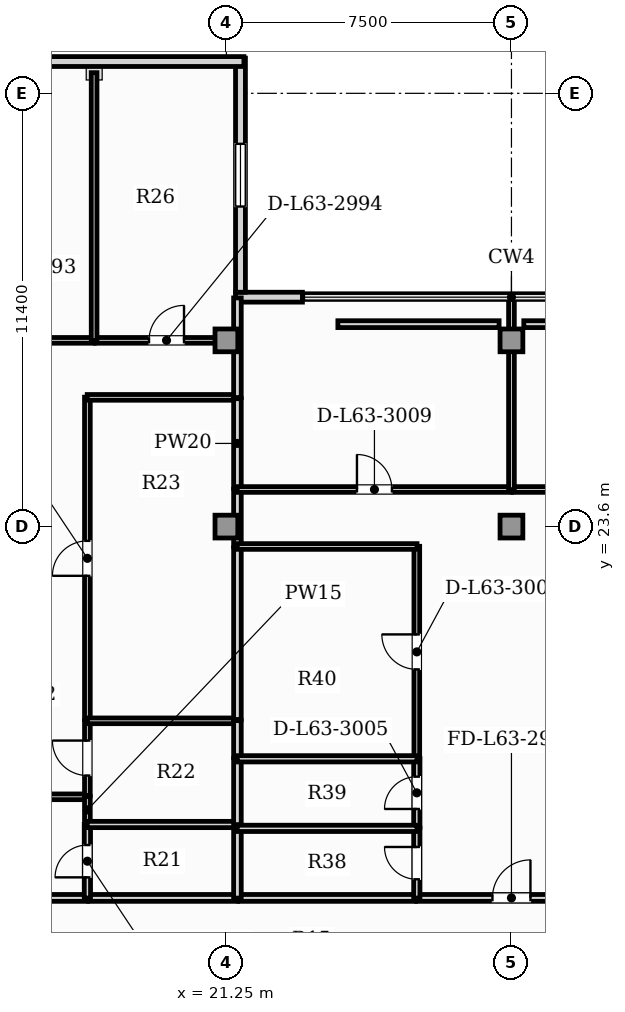
"""IFC4 building model, lengths in metres.
Left out: names, types, materials, properties, quantities, classifications, styles, units other than length and angle.
Written with IfcOpenShell. Run it as: python <this file> out.ifc"""

import sys

from ifc_helpers import new_model, si_unit, direction, frame, frame_2d, origin, origin_2d, place, context, subcontext, project, spatial, rectangle, extrude, element, fill, save


model = new_model("IFC4")
c1 = context("Model", 3, precision=1e-05, world=origin(), true_north=direction((0.0, 1.0)))
c2 = subcontext(c1, "Body", "Model", "MODEL_VIEW")
j1 = project(units=[si_unit("LENGTHUNIT", "METRE"), si_unit("PLANEANGLEUNIT", "RADIAN")], contexts=[c1])
p1 = place(None, origin())
s1 = spatial("IfcSite", under=j1, at=p1, CompositionType="ELEMENT")
p2 = place(p1, origin())
s2 = spatial("IfcBuilding", under=s1, at=p2, CompositionType="ELEMENT")
p3 = place(p2, frame((0.0, 0.0, 256.75)))
s3 = spatial("IfcBuildingStorey", under=s2, at=p3, CompositionType="ELEMENT", Elevation=256.75)
for number, where, z_axis, x_axis in (
    (1, (21.25, 23.6, 0.0), (0.0, 0.0, 1.0), (1.0, 0.0, 0.0)),
    (2, (28.75, 23.6, 0.0), (0.0, 0.0, 1.0), (1.0, 0.0, 0.0)),
    (3, (21.25, 28.5, 0.0), (0.0, 0.0, 1.0), (1.0, 0.0, 0.0)),
    (4, (28.75, 28.5, 0.0), (0.0, 0.0, 1.0), (1.0, 0.0, 0.0)),
):
    element("IfcColumn", number, at=place(p3, frame(where, z_axis=z_axis, x_axis=x_axis)), inside=s3, PredefinedType="COLUMN", context=c2, shape_type="SweptSolid", body=[
        extrude(rectangle(XDim=0.6, YDim=0.6, at=origin_2d()), origin(), (0.0, 0.0, 1.0), 3.85),
    ])
p4 = place(p3, frame((21.49, 29.636, 0.0), z_axis=(0.0, 0.0, 1.0), x_axis=(1.0, 0.0, 0.0)))
e5 = element("IfcWall", 5, at=p4, inside=s3, PredefinedType="SOLIDWALL", context=c2, shape_type="SweptSolid", body=[
    extrude(rectangle(XDim=1.76, YDim=0.26, at=frame_2d((0.88, 0.0))), origin(), (0.0, 0.0, 1.0), 3.65),
])
p5 = place(p3, frame((21.62, 29.766, 0.0), z_axis=(0.0, 0.0, 1.0), x_axis=(0.0, 1.0, 0.0)))
e6 = element("IfcWall", 6, at=p5, inside=s3, PredefinedType="SOLIDWALL", context=c2, shape_type="SweptSolid", body=[
    extrude(rectangle(XDim=6.16, YDim=0.26, at=frame_2d((3.08, 0.0))), origin(), (0.0, 0.0, 1.0), 3.65),
])
p6 = place(p5, frame((2.255, 0.0, 0.88)))
e7 = element("IfcOpeningElement", 7, at=p6, cuts=e6, PredefinedType="OPENING", context=c2, shape_type="SweptSolid", body=[
    extrude(rectangle(XDim=1.65, YDim=2.0, at=frame_2d((0.825, 1.0))), frame((0.0, 0.14, 0.0), z_axis=(0.0, -1.0, 0.0), x_axis=(1.0, 0.0, 0.0)), (0.0, 0.0, 1.0), 0.28),
])
p7 = place(p3, frame((21.71, 35.836, 0.0), z_axis=(0.0, 0.0, 1.0), x_axis=(-1.0, 0.0, 0.0)))
e8 = element("IfcWall", 8, at=p7, inside=s3, PredefinedType="SOLIDWALL", context=c2, shape_type="SweptSolid", body=[
    extrude(rectangle(XDim=10.543, YDim=0.26, at=frame_2d((5.272, 0.0))), origin(), (0.0, 0.0, 1.0), 3.65),
])
p8 = place(p7, frame((8.863, 0.0, 0.95)))
e9 = element("IfcOpeningElement", 9, at=p8, cuts=e8, PredefinedType="OPENING", context=c2, shape_type="SweptSolid", body=[
    extrude(rectangle(XDim=0.9, YDim=1.5, at=frame_2d((0.45, 0.75))), frame((0.0, 0.14, 0.0), z_axis=(0.0, -1.0, 0.0), x_axis=(1.0, 0.0, 0.0)), (0.0, 0.0, 1.0), 0.28),
])
p9 = place(p7, frame((5.963, 0.0, 0.88)))
e10 = element("IfcOpeningElement", 10, at=p9, cuts=e8, PredefinedType="OPENING", context=c2, shape_type="SweptSolid", body=[
    extrude(rectangle(XDim=1.65, YDim=2.0, at=frame_2d((0.825, 1.0))), frame((0.0, 0.14, 0.0), z_axis=(0.0, -1.0, 0.0), x_axis=(1.0, 0.0, 0.0)), (0.0, 0.0, 1.0), 0.28),
])
p10 = place(p3, frame((12.607, 13.83, 0.0), z_axis=(0.0, 0.0, 1.0), x_axis=(1.0, 0.0, 0.0)))
e11 = element("IfcWall", 11, at=p10, inside=s3, PredefinedType="PARTITIONING", context=c2, shape_type="SweptSolid", body=[
    extrude(rectangle(XDim=4.99, YDim=0.18, at=frame_2d((2.495, 0.0))), origin(), (0.0, 0.0, 1.0), 3.65),
])
p11 = place(p10, frame((1.995, 0.0, 0.0)))
e12 = element("IfcOpeningElement", 12, at=p11, cuts=e11, PredefinedType="OPENING", context=c2, shape_type="SweptSolid", body=[
    extrude(rectangle(XDim=1.0, YDim=2.15, at=frame_2d((0.5, 1.075))), frame((0.0, 0.1, 0.0), z_axis=(0.0, -1.0, 0.0), x_axis=(1.0, 0.0, 0.0)), (0.0, 0.0, 1.0), 0.2),
])
p12 = place(p3, frame((17.627, 13.83, 0.0), z_axis=(0.0, 0.0, 1.0), x_axis=(1.0, 0.0, 0.0)))
e13 = element("IfcWall", 13, at=p12, inside=s3, PredefinedType="PARTITIONING", context=c2, shape_type="SweptSolid", body=[
    extrude(rectangle(XDim=3.918, YDim=0.18, at=frame_2d((1.959, 0.0))), origin(), (0.0, 0.0, 1.0), 3.65),
])
p13 = place(p3, frame((26.255, 13.83, 0.0), z_axis=(0.0, 0.0, 1.0), x_axis=(1.0, 0.0, 0.0)))
e14 = element("IfcWall", 14, at=p13, inside=s3, PredefinedType="PARTITIONING", context=c2, shape_type="SweptSolid", body=[
    extrude(rectangle(XDim=4.99, YDim=0.18, at=frame_2d((2.495, 0.0))), origin(), (0.0, 0.0, 1.0), 3.65),
])
p14 = place(p13, frame((1.995, 0.0, 0.0)))
e15 = element("IfcOpeningElement", 15, at=p14, cuts=e14, PredefinedType="OPENING", context=c2, shape_type="SweptSolid", body=[
    extrude(rectangle(XDim=1.0, YDim=2.15, at=frame_2d((0.5, 1.075))), frame((0.0, 0.1, 0.0), z_axis=(0.0, -1.0, 0.0), x_axis=(1.0, 0.0, 0.0)), (0.0, 0.0, 1.0), 0.2),
])
p15 = place(p3, frame((21.575, 13.83, 0.0), z_axis=(0.0, 0.0, 1.0), x_axis=(1.0, 0.0, 0.0)))
e16 = element("IfcWall", 16, at=p15, inside=s3, PredefinedType="PARTITIONING", context=c2, shape_type="SweptSolid", body=[
    extrude(rectangle(XDim=4.65, YDim=0.18, at=frame_2d((2.325, 0.0))), origin(), (0.0, 0.0, 1.0), 3.65),
])
p16 = place(p3, frame((12.607, 16.49, 0.0), z_axis=(0.0, 0.0, 1.0), x_axis=(1.0, 0.0, 0.0)))
e17 = element("IfcWall", 17, at=p16, inside=s3, PredefinedType="PARTITIONING", context=c2, shape_type="SweptSolid", body=[
    extrude(rectangle(XDim=4.99, YDim=0.15, at=frame_2d((2.495, 0.0))), origin(), (0.0, 0.0, 1.0), 3.65),
])
p17 = place(p16, frame((2.035, 0.0, 0.0)))
e18 = element("IfcOpeningElement", 18, at=p17, cuts=e17, PredefinedType="OPENING", context=c2, shape_type="SweptSolid", body=[
    extrude(rectangle(XDim=0.92, YDim=2.1, at=frame_2d((0.46, 1.05))), frame((0.0, 0.085, 0.0), z_axis=(0.0, -1.0, 0.0), x_axis=(1.0, 0.0, 0.0)), (0.0, 0.0, 1.0), 0.17),
])
p18 = place(p3, frame((17.592, 13.825, 0.0), z_axis=(0.0, 0.0, 1.0), x_axis=(0.0, 1.0, 0.0)))
e19 = element("IfcWall", 19, at=p18, inside=s3, PredefinedType="PLUMBINGWALL", context=c2, shape_type="SweptSolid", body=[
    extrude(rectangle(XDim=1.942, YDim=0.165, at=frame_2d((0.971, 0.0))), origin(), (0.0, 0.0, 1.0), 3.65),
])
p19 = place(p18, frame((0.546, 0.0, 0.0)))
e20 = element("IfcOpeningElement", 20, at=p19, cuts=e19, PredefinedType="OPENING", context=c2, shape_type="SweptSolid", body=[
    extrude(rectangle(XDim=0.85, YDim=2.1, at=frame_2d((0.425, 1.05))), frame((0.0, 0.093, 0.0), z_axis=(0.0, -1.0, 0.0), x_axis=(1.0, 0.0, 0.0)), (0.0, 0.0, 1.0), 0.185),
])
p20 = place(p3, frame((17.592, 15.797, 0.0), z_axis=(0.0, 0.0, 1.0), x_axis=(0.0, 1.0, 0.0)))
e21 = element("IfcWall", 21, at=p20, inside=s3, PredefinedType="PARTITIONING", context=c2, shape_type="SweptSolid", body=[
    extrude(rectangle(XDim=0.699, YDim=0.15, at=frame_2d((0.349, 0.0))), origin(), (0.0, 0.0, 1.0), 3.65),
])
p21 = place(p3, frame((17.592, 16.525, 0.0), z_axis=(0.0, 0.0, 1.0), x_axis=(0.0, 1.0, 0.0)))
e22 = element("IfcWall", 22, at=p21, inside=s3, PredefinedType="PARTITIONING", context=c2, shape_type="SweptSolid", body=[
    extrude(rectangle(XDim=1.969, YDim=0.15, at=frame_2d((0.984, 0.0))), origin(), (0.0, 0.0, 1.0), 3.65),
])
p22 = place(p21, frame((0.524, 0.0, 0.0)))
e23 = element("IfcOpeningElement", 23, at=p22, cuts=e22, PredefinedType="OPENING", context=c2, shape_type="SweptSolid", body=[
    extrude(rectangle(XDim=0.92, YDim=2.1, at=frame_2d((0.46, 1.05))), frame((0.0, 0.085, 0.0), z_axis=(0.0, -1.0, 0.0), x_axis=(1.0, 0.0, 0.0)), (0.0, 0.0, 1.0), 0.17),
])
p23 = place(p3, frame((17.592, 18.524, 0.0), z_axis=(0.0, 0.0, 1.0), x_axis=(0.0, 1.0, 0.0)))
e24 = element("IfcWall", 24, at=p23, inside=s3, PredefinedType="PARTITIONING", context=c2, shape_type="SweptSolid", body=[
    extrude(rectangle(XDim=8.48, YDim=0.15, at=frame_2d((4.24, 0.0))), origin(), (0.0, 0.0, 1.0), 3.65),
])
p24 = place(p23, frame((3.78, 0.0, 0.0)))
e25 = element("IfcOpeningElement", 25, at=p24, cuts=e24, PredefinedType="OPENING", context=c2, shape_type="SweptSolid", body=[
    extrude(rectangle(XDim=0.92, YDim=2.1, at=frame_2d((0.46, 1.05))), frame((0.0, 0.085, 0.0), z_axis=(0.0, -1.0, 0.0), x_axis=(1.0, 0.0, 0.0)), (0.0, 0.0, 1.0), 0.17),
])
p25 = place(p3, frame((17.587, 27.0, 0.0), z_axis=(0.0, 0.0, 1.0), x_axis=(1.0, 0.0, 0.0)))
e26 = element("IfcWall", 26, at=p25, inside=s3, PredefinedType="PARTITIONING", context=c2, shape_type="SweptSolid", body=[
    extrude(rectangle(XDim=3.958, YDim=0.15, at=frame_2d((1.979, 0.0))), origin(), (0.0, 0.0, 1.0), 3.65),
])
p26 = place(p3, frame((13.785, 28.5, 0.0), z_axis=(0.0, 0.0, 1.0), x_axis=(1.0, 0.0, 0.0)))
e27 = element("IfcWall", 27, at=p26, inside=s3, PredefinedType="PARTITIONING", context=c2, shape_type="SweptSolid", body=[
    extrude(rectangle(XDim=3.989, YDim=0.15, at=frame_2d((1.994, 0.0))), origin(), (0.0, 0.0, 1.0), 3.105),
])
p27 = place(p26, frame((1.534, 0.0, 0.0)))
e28 = element("IfcOpeningElement", 28, at=p27, cuts=e27, PredefinedType="OPENING", context=c2, shape_type="SweptSolid", body=[
    extrude(rectangle(XDim=0.92, YDim=2.1, at=frame_2d((0.46, 1.05))), frame((0.0, 0.085, 0.0), z_axis=(0.0, -1.0, 0.0), x_axis=(1.0, 0.0, 0.0)), (0.0, 0.0, 1.0), 0.17),
])
p28 = place(p3, frame((17.804, 28.5, 0.0), z_axis=(0.0, 0.0, 1.0), x_axis=(1.0, 0.0, 0.0)))
e29 = element("IfcWall", 29, at=p28, inside=s3, PredefinedType="PARTITIONING", context=c2, shape_type="SweptSolid", body=[
    extrude(rectangle(XDim=3.741, YDim=0.15, at=frame_2d((1.871, 0.0))), origin(), (0.0, 0.0, 1.0), 3.105),
])
p29 = place(p28, frame((1.411, 0.0, 0.0)))
e30 = element("IfcOpeningElement", 30, at=p29, cuts=e29, PredefinedType="OPENING", context=c2, shape_type="SweptSolid", body=[
    extrude(rectangle(XDim=0.92, YDim=2.1, at=frame_2d((0.46, 1.05))), frame((0.0, 0.085, 0.0), z_axis=(0.0, -1.0, 0.0), x_axis=(1.0, 0.0, 0.0)), (0.0, 0.0, 1.0), 0.17),
])
p30 = place(p3, frame((21.54, 26.995, 0.0), z_axis=(0.0, 0.0, 1.0), x_axis=(0.0, 1.0, 0.0)))
e31 = element("IfcWall", 31, at=p30, inside=s3, PredefinedType="PARTITIONING", context=c2, shape_type="SweptSolid", body=[
    extrude(rectangle(XDim=2.622, YDim=0.2, at=frame_2d((1.311, 0.0))), origin(), (0.0, 0.0, 1.0), 3.65),
])
p31 = place(p3, frame((17.587, 15.762, 0.0), z_axis=(0.0, 0.0, 1.0), x_axis=(1.0, 0.0, 0.0)))
e32 = element("IfcWall", 32, at=p31, inside=s3, PredefinedType="PLUMBINGWALL", context=c2, shape_type="SweptSolid", body=[
    extrude(rectangle(XDim=3.958, YDim=0.165, at=frame_2d((1.979, 0.0))), origin(), (0.0, 0.0, 1.0), 3.65),
])
p32 = place(p3, frame((21.54, 13.825, 0.0), z_axis=(0.0, 0.0, 1.0), x_axis=(0.0, 1.0, 0.0)))
e33 = element("IfcWall", 33, at=p32, inside=s3, PredefinedType="PARTITIONING", context=c2, shape_type="SweptSolid", body=[
    extrude(rectangle(XDim=1.84, YDim=0.2, at=frame_2d((0.92, 0.0))), origin(), (0.0, 0.0, 1.0), 3.65),
])
p33 = place(p3, frame((17.587, 18.49, 0.0), z_axis=(0.0, 0.0, 1.0), x_axis=(1.0, 0.0, 0.0)))
e34 = element("IfcWall", 34, at=p33, inside=s3, PredefinedType="PARTITIONING", context=c2, shape_type="SweptSolid", body=[
    extrude(rectangle(XDim=3.958, YDim=0.15, at=frame_2d((1.979, 0.0))), origin(), (0.0, 0.0, 1.0), 3.65),
])
p34 = place(p3, frame((21.54, 15.757, 0.0), z_axis=(0.0, 0.0, 1.0), x_axis=(0.0, 1.0, 0.0)))
e35 = element("IfcWall", 35, at=p34, inside=s3, PredefinedType="PARTITIONING", context=c2, shape_type="SweptSolid", body=[
    extrude(rectangle(XDim=1.739, YDim=0.2, at=frame_2d((0.869, 0.0))), origin(), (0.0, 0.0, 1.0), 3.65),
])
p35 = place(p3, frame((21.54, 17.525, 0.0), z_axis=(0.0, 0.0, 1.0), x_axis=(0.0, 1.0, 0.0)))
e36 = element("IfcWall", 36, at=p35, inside=s3, PredefinedType="PARTITIONING", context=c2, shape_type="SweptSolid", body=[
    extrude(rectangle(XDim=0.969, YDim=0.2, at=frame_2d((0.485, 0.0))), origin(), (0.0, 0.0, 1.0), 3.65),
])
p36 = place(p3, frame((21.54, 23.071, 0.0), z_axis=(0.0, 0.0, 1.0), x_axis=(0.0, 1.0, 0.0)))
e37 = element("IfcWall", 37, at=p36, inside=s3, PredefinedType="PARTITIONING", context=c2, shape_type="SweptSolid", body=[
    extrude(rectangle(XDim=1.51, YDim=0.2, at=frame_2d((0.755, 0.0))), origin(), (0.0, 0.0, 1.0), 3.65),
])
p37 = place(p3, frame((21.54, 18.524, 0.0), z_axis=(0.0, 0.0, 1.0), x_axis=(0.0, 1.0, 0.0)))
e38 = element("IfcWall", 38, at=p37, inside=s3, PredefinedType="PARTITIONING", context=c2, shape_type="SweptSolid", body=[
    extrude(rectangle(XDim=4.517, YDim=0.2, at=frame_2d((2.258, 0.0))), origin(), (0.0, 0.0, 1.0), 3.65),
])
p38 = place(p3, frame((21.54, 24.611, 0.0), z_axis=(0.0, 0.0, 1.0), x_axis=(0.0, 1.0, 0.0)))
e39 = element("IfcWall", 39, at=p38, inside=s3, PredefinedType="PARTITIONING", context=c2, shape_type="SweptSolid", body=[
    extrude(rectangle(XDim=2.354, YDim=0.2, at=frame_2d((1.177, 0.0))), origin(), (0.0, 0.0, 1.0), 3.65),
])
p39 = place(p3, frame((17.769, 28.495, 0.0), z_axis=(0.0, 0.0, 1.0), x_axis=(0.0, 1.0, 0.0)))
e40 = element("IfcWall", 40, at=p39, inside=s3, PredefinedType="PARTITIONING", context=c2, shape_type="SweptSolid", body=[
    extrude(rectangle(XDim=7.048, YDim=0.15, at=frame_2d((3.524, 0.0))), origin(), (0.0, 0.0, 1.0), 3.65),
])
p40 = place(p3, frame((26.26, 13.825, 0.0), z_axis=(0.0, 0.0, 1.0), x_axis=(0.0, 1.0, 0.0)))
e41 = element("IfcWall", 41, at=p40, inside=s3, PredefinedType="PLUMBINGWALL", context=c2, shape_type="SweptSolid", body=[
    extrude(rectangle(XDim=1.84, YDim=0.165, at=frame_2d((0.92, 0.0))), origin(), (0.0, 0.0, 1.0), 3.65),
])
p41 = place(p40, frame((0.495, 0.0, 0.0)))
e42 = element("IfcOpeningElement", 42, at=p41, cuts=e41, PredefinedType="OPENING", context=c2, shape_type="SweptSolid", body=[
    extrude(rectangle(XDim=0.85, YDim=2.1, at=frame_2d((0.425, 1.05))), frame((0.0, 0.093, 0.0), z_axis=(0.0, -1.0, 0.0), x_axis=(1.0, 0.0, 0.0)), (0.0, 0.0, 1.0), 0.185),
])
p42 = place(p3, frame((26.26, 15.695, 0.0), z_axis=(0.0, 0.0, 1.0), x_axis=(0.0, 1.0, 0.0)))
e43 = element("IfcWall", 43, at=p42, inside=s3, PredefinedType="PLUMBINGWALL", context=c2, shape_type="SweptSolid", body=[
    extrude(rectangle(XDim=1.8, YDim=0.165, at=frame_2d((0.9, 0.0))), origin(), (0.0, 0.0, 1.0), 3.65),
])
p43 = place(p42, frame((0.475, 0.0, 0.0)))
e44 = element("IfcOpeningElement", 44, at=p43, cuts=e43, PredefinedType="OPENING", context=c2, shape_type="SweptSolid", body=[
    extrude(rectangle(XDim=0.85, YDim=2.1, at=frame_2d((0.425, 1.05))), frame((0.0, 0.093, 0.0), z_axis=(0.0, -1.0, 0.0), x_axis=(1.0, 0.0, 0.0)), (0.0, 0.0, 1.0), 0.185),
])
p44 = place(p3, frame((26.26, 17.525, 0.0), z_axis=(0.0, 0.0, 1.0), x_axis=(0.0, 1.0, 0.0)))
e45 = element("IfcWall", 45, at=p44, inside=s3, PredefinedType="PARTITIONING", context=c2, shape_type="SweptSolid", body=[
    extrude(rectangle(XDim=5.556, YDim=0.15, at=frame_2d((2.778, 0.0))), origin(), (0.0, 0.0, 1.0), 3.65),
])
p45 = place(p44, frame((2.318, 0.0, 0.0)))
e46 = element("IfcOpeningElement", 46, at=p45, cuts=e45, PredefinedType="OPENING", context=c2, shape_type="SweptSolid", body=[
    extrude(rectangle(XDim=0.92, YDim=2.1, at=frame_2d((0.46, 1.05))), frame((0.0, 0.085, 0.0), z_axis=(0.0, -1.0, 0.0), x_axis=(1.0, 0.0, 0.0)), (0.0, 0.0, 1.0), 0.17),
])
p46 = place(p3, frame((21.535, 23.076, 0.0), z_axis=(0.0, 0.0, 1.0), x_axis=(1.0, 0.0, 0.0)))
e47 = element("IfcWall", 47, at=p46, inside=s3, PredefinedType="PARTITIONING", context=c2, shape_type="SweptSolid", body=[
    extrude(rectangle(XDim=4.73, YDim=0.15, at=frame_2d((2.365, 0.0))), origin(), (0.0, 0.0, 1.0), 3.65),
])
p47 = place(p3, frame((21.535, 24.576, 0.0), z_axis=(0.0, 0.0, 1.0), x_axis=(1.0, 0.0, 0.0)))
e48 = element("IfcWall", 48, at=p47, inside=s3, PredefinedType="PARTITIONING", context=c2, shape_type="SweptSolid", body=[
    extrude(rectangle(XDim=7.22, YDim=0.15, at=frame_2d((3.61, 0.0))), origin(), (0.0, 0.0, 1.0), 3.65),
])
p48 = place(p47, frame((3.15, 0.0, 0.0)))
e49 = element("IfcOpeningElement", 49, at=p48, cuts=e48, PredefinedType="OPENING", context=c2, shape_type="SweptSolid", body=[
    extrude(rectangle(XDim=0.92, YDim=2.1, at=frame_2d((0.46, 1.05))), frame((0.0, 0.085, 0.0), z_axis=(0.0, -1.0, 0.0), x_axis=(1.0, 0.0, 0.0)), (0.0, 0.0, 1.0), 0.17),
])
p49 = place(p3, frame((28.785, 24.576, 0.0), z_axis=(0.0, 0.0, 1.0), x_axis=(1.0, 0.0, 0.0)))
e50 = element("IfcWall", 50, at=p49, inside=s3, PredefinedType="PARTITIONING", context=c2, shape_type="SweptSolid", body=[
    extrude(rectangle(XDim=7.18, YDim=0.15, at=frame_2d((3.59, 0.0))), origin(), (0.0, 0.0, 1.0), 3.65),
])
p50 = place(p49, frame((3.13, 0.0, 0.0)))
e51 = element("IfcOpeningElement", 51, at=p50, cuts=e50, PredefinedType="OPENING", context=c2, shape_type="SweptSolid", body=[
    extrude(rectangle(XDim=0.92, YDim=2.1, at=frame_2d((0.46, 1.05))), frame((0.0, 0.085, 0.0), z_axis=(0.0, -1.0, 0.0), x_axis=(1.0, 0.0, 0.0)), (0.0, 0.0, 1.0), 0.17),
])
for number, where, z_axis, x_axis in (
    (52, (21.535, 15.66, 0.0), (0.0, 0.0, 1.0), (1.0, 0.0, 0.0)),
    (53, (21.535, 17.49, 0.0), (0.0, 0.0, 1.0), (1.0, 0.0, 0.0)),
):
    element("IfcWall", number, at=place(p3, frame(where, z_axis=z_axis, x_axis=x_axis)), inside=s3, PredefinedType="PLUMBINGWALL", context=c2, shape_type="SweptSolid", body=[
        extrude(rectangle(XDim=4.73, YDim=0.165, at=frame_2d((2.365, 0.0))), origin(), (0.0, 0.0, 1.0), 3.65),
    ])
p51 = place(p3, frame((28.75, 24.571, 0.0), z_axis=(0.0, 0.0, 1.0), x_axis=(0.0, 1.0, 0.0)))
e54 = element("IfcWall", 54, at=p51, inside=s3, PredefinedType="PARTITIONING", context=c2, shape_type="SweptSolid", body=[
    extrude(rectangle(XDim=5.041, YDim=0.15, at=frame_2d((2.521, 0.0))), origin(), (0.0, 0.0, 1.0), 3.295),
])
for number, where, z_axis, x_axis in (
    (55, (24.183, 28.926, 0.0), (0.0, 0.0, 1.0), (1.0, 0.0, 0.0)),
    (56, (29.075, 28.926, 0.0), (0.0, 0.0, 1.0), (1.0, 0.0, 0.0)),
):
    element("IfcWall", number, at=place(p3, frame(where, z_axis=z_axis, x_axis=x_axis)), inside=s3, PredefinedType="PARTITIONING", context=c2, shape_type="SweptSolid", body=[
        extrude(rectangle(XDim=4.242, YDim=0.18, at=frame_2d((2.121, 0.0))), origin(), (0.0, 0.0, 1.0), 3.65),
    ])
p52 = place(p6, origin())
e57 = element("IfcWindow", 57, at=p52, inside=s3, PartitioningType="SINGLE_PANEL", PredefinedType="WINDOW", context=c2, shape_type="SweptSolid", body=[
    extrude(rectangle(XDim=1.65, YDim=2.0, at=frame_2d((0.825, 1.0))), frame((0.0, 0.03, 0.0), z_axis=(0.0, -1.0, 0.0), x_axis=(1.0, 0.0, 0.0)), (0.0, 0.0, 1.0), 0.06),
])
fill(e7, e57)
p53 = place(p14, origin())
e58 = element("IfcDoor", 58, at=p53, inside=s3, OperationType="SINGLE_SWING_RIGHT", PredefinedType="DOOR", context=c2, shape_type="SweptSolid", body=[
    extrude(rectangle(XDim=1.0, YDim=2.15, at=frame_2d((0.5, 1.075))), frame((0.0, 0.025, 0.0), z_axis=(0.0, -1.0, 0.0), x_axis=(1.0, 0.0, 0.0)), (0.0, 0.0, 1.0), 0.05),
])
fill(e15, e58)
p54 = place(p19, origin())
e59 = element("IfcDoor", 59, at=p54, inside=s3, OperationType="SINGLE_SWING_LEFT", PredefinedType="DOOR", context=c2, shape_type="SweptSolid", body=[
    extrude(rectangle(XDim=0.85, YDim=2.1, at=frame_2d((0.425, 1.05))), frame((0.0, 0.025, 0.0), z_axis=(0.0, -1.0, 0.0), x_axis=(1.0, 0.0, 0.0)), (0.0, 0.0, 1.0), 0.05),
])
fill(e20, e59)
p55 = place(p22, origin())
e60 = element("IfcDoor", 60, at=p55, inside=s3, OperationType="SINGLE_SWING_RIGHT", PredefinedType="DOOR", context=c2, shape_type="SweptSolid", body=[
    extrude(rectangle(XDim=0.92, YDim=2.1, at=frame_2d((0.46, 1.05))), frame((0.0, 0.025, 0.0), z_axis=(0.0, -1.0, 0.0), x_axis=(1.0, 0.0, 0.0)), (0.0, 0.0, 1.0), 0.05),
])
fill(e23, e60)
p56 = place(p24, origin())
e61 = element("IfcDoor", 61, at=p56, inside=s3, OperationType="SINGLE_SWING_LEFT", PredefinedType="DOOR", context=c2, shape_type="SweptSolid", body=[
    extrude(rectangle(XDim=0.92, YDim=2.1, at=frame_2d((0.46, 1.05))), frame((0.0, 0.025, 0.0), z_axis=(0.0, -1.0, 0.0), x_axis=(1.0, 0.0, 0.0)), (0.0, 0.0, 1.0), 0.05),
])
fill(e25, e61)
p57 = place(p29, origin())
e62 = element("IfcDoor", 62, at=p57, inside=s3, OperationType="SINGLE_SWING_RIGHT", PredefinedType="DOOR", context=c2, shape_type="SweptSolid", body=[
    extrude(rectangle(XDim=0.92, YDim=2.1, at=frame_2d((0.46, 1.05))), frame((0.0, 0.025, 0.0), z_axis=(0.0, -1.0, 0.0), x_axis=(1.0, 0.0, 0.0)), (0.0, 0.0, 1.0), 0.05),
])
fill(e30, e62)
p58 = place(p41, origin())
e63 = element("IfcDoor", 63, at=p58, inside=s3, OperationType="SINGLE_SWING_RIGHT", PredefinedType="DOOR", context=c2, shape_type="SweptSolid", body=[
    extrude(rectangle(XDim=0.85, YDim=2.1, at=frame_2d((0.425, 1.05))), frame((0.0, 0.025, 0.0), z_axis=(0.0, -1.0, 0.0), x_axis=(1.0, 0.0, 0.0)), (0.0, 0.0, 1.0), 0.05),
])
fill(e42, e63)
p59 = place(p43, origin())
e64 = element("IfcDoor", 64, at=p59, inside=s3, OperationType="SINGLE_SWING_LEFT", PredefinedType="DOOR", context=c2, shape_type="SweptSolid", body=[
    extrude(rectangle(XDim=0.85, YDim=2.1, at=frame_2d((0.425, 1.05))), frame((0.0, 0.025, 0.0), z_axis=(0.0, -1.0, 0.0), x_axis=(1.0, 0.0, 0.0)), (0.0, 0.0, 1.0), 0.05),
])
fill(e44, e64)
p60 = place(p45, origin())
e65 = element("IfcDoor", 65, at=p60, inside=s3, OperationType="SINGLE_SWING_RIGHT", PredefinedType="DOOR", context=c2, shape_type="SweptSolid", body=[
    extrude(rectangle(XDim=0.92, YDim=2.1, at=frame_2d((0.46, 1.05))), frame((0.0, 0.025, 0.0), z_axis=(0.0, -1.0, 0.0), x_axis=(1.0, 0.0, 0.0)), (0.0, 0.0, 1.0), 0.05),
])
fill(e46, e65)
p61 = place(p48, origin())
e66 = element("IfcDoor", 66, at=p61, inside=s3, OperationType="SINGLE_SWING_LEFT", PredefinedType="DOOR", context=c2, shape_type="SweptSolid", body=[
    extrude(rectangle(XDim=0.92, YDim=2.1, at=frame_2d((0.46, 1.05))), frame((0.0, 0.025, 0.0), z_axis=(0.0, -1.0, 0.0), x_axis=(1.0, 0.0, 0.0)), (0.0, 0.0, 1.0), 0.05),
])
fill(e49, e66)
save(model, sys.argv[1])
